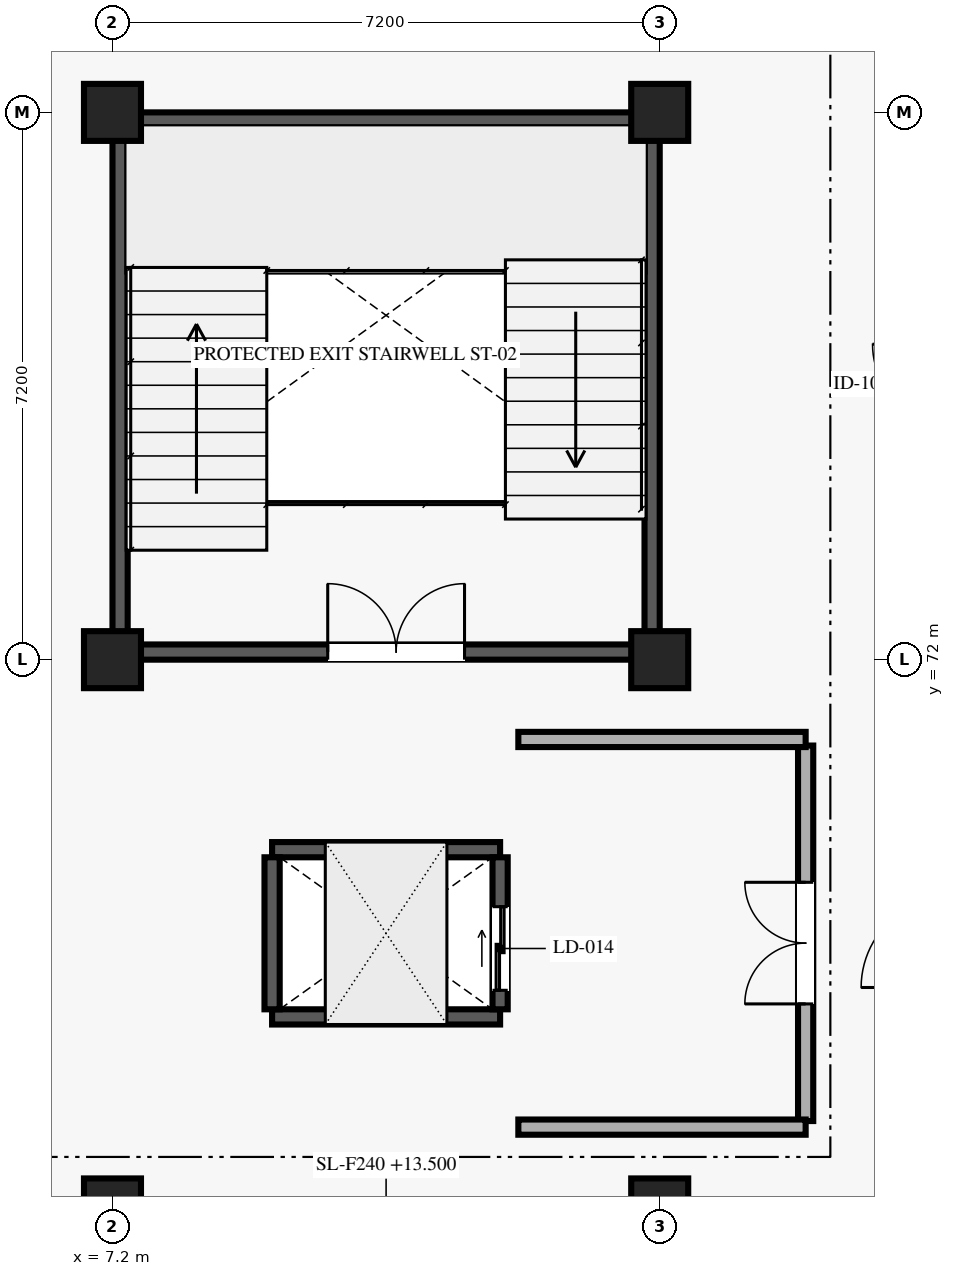
"""IFC4 building model, lengths in metres.
Left out: names, types, materials, properties, quantities, classifications, styles, units other than length and angle.
Written with IfcOpenShell. Run it as: python <this file> out.ifc"""

import sys

from ifc_helpers import new_model, si_unit, direction, frame, frame_2d, origin, origin_2d, place, context, subcontext, project, spatial, rectangle, extrude, element, fill, save


model = new_model("IFC4")
c1 = context("Model", 3, precision=1e-05, world=origin(), true_north=direction((0.0, 1.0)))
c2 = subcontext(c1, "Body", "Model", "MODEL_VIEW")
j1 = project(units=[si_unit("LENGTHUNIT", "METRE"), si_unit("PLANEANGLEUNIT", "RADIAN")], contexts=[c1])
p1 = place(None, origin())
s1 = spatial("IfcSite", under=j1, at=p1, CompositionType="ELEMENT")
p2 = place(p1, origin())
s2 = spatial("IfcBuilding", under=s1, at=p2, CompositionType="ELEMENT")
p3 = place(p2, frame((0.0, 0.0, 13.5)))
s3 = spatial("IfcBuildingStorey", under=s2, at=p3, CompositionType="ELEMENT", Elevation=13.5)
for number, where, z_axis, x_axis in (
    (1, (7.2, 64.8, 0.0), (0.0, 0.0, 1.0), (1.0, 0.0, 0.0)),
    (2, (7.2, 72.0, 0.0), (0.0, 0.0, 1.0), (1.0, 0.0, 0.0)),
    (3, (7.2, 79.2, 0.0), (0.0, 0.0, 1.0), (1.0, 0.0, 0.0)),
    (4, (14.4, 64.8, 0.0), (0.0, 0.0, 1.0), (1.0, 0.0, 0.0)),
    (5, (14.4, 72.0, 0.0), (0.0, 0.0, 1.0), (1.0, 0.0, 0.0)),
    (6, (14.4, 79.2, 0.0), (0.0, 0.0, 1.0), (1.0, 0.0, 0.0)),
):
    element("IfcColumn", number, at=place(p3, frame(where, z_axis=z_axis, x_axis=x_axis)), inside=s3, PredefinedType="COLUMN", context=c2, shape_type="SweptSolid", body=[
        extrude(rectangle(XDim=0.75, YDim=0.75, at=origin_2d()), origin(), (0.0, 0.0, 1.0), 4.05),
    ])
p4 = place(p3, frame((7.4, 72.1, 0.0), z_axis=(0.0, 0.0, 1.0), x_axis=(1.0, 0.0, 0.0)))
e7 = element("IfcWall", 7, at=p4, inside=s3, PredefinedType="SHEAR", context=c2, shape_type="SweptSolid", body=[
    extrude(rectangle(XDim=6.8, YDim=0.2, at=frame_2d((3.4, 0.0))), origin(), (0.0, 0.0, 1.0), 3.81),
])
p5 = place(p4, frame((2.632, 0.0, 0.0)))
e8 = element("IfcOpeningElement", 8, at=p5, cuts=e7, PredefinedType="OPENING", context=c2, shape_type="SweptSolid", body=[
    extrude(rectangle(XDim=1.8, YDim=2.2, at=frame_2d((0.9, 1.1))), frame((0.0, 0.11, 0.0), z_axis=(0.0, -1.0, 0.0), x_axis=(1.0, 0.0, 0.0)), (0.0, 0.0, 1.0), 0.22),
])
for number, where, z_axis, x_axis in (
    (9, (7.4, 79.1, 0.0), (0.0, 0.0, 1.0), (1.0, 0.0, 0.0)),
    (10, (7.3, 72.2, 0.0), (0.0, 0.0, 1.0), (0.0, 1.0, 0.0)),
    (11, (14.3, 72.2, 0.0), (0.0, 0.0, 1.0), (0.0, 1.0, 0.0)),
):
    element("IfcWall", number, at=place(p3, frame(where, z_axis=z_axis, x_axis=x_axis)), inside=s3, PredefinedType="SHEAR", context=c2, shape_type="SweptSolid", body=[
        extrude(rectangle(XDim=6.8, YDim=0.2, at=frame_2d((3.4, 0.0))), origin(), (0.0, 0.0, 1.0), 3.81),
    ])
for number, where, z_axis, x_axis in (
    (12, (9.3, 67.3, 0.0), (0.0, 0.0, 1.0), (1.0, 0.0, 0.0)),
    (13, (9.3, 69.5, 0.0), (0.0, 0.0, 1.0), (1.0, 0.0, 0.0)),
):
    element("IfcWall", number, at=place(p3, frame(where, z_axis=z_axis, x_axis=x_axis)), inside=s3, PredefinedType="SHEAR", context=c2, shape_type="SweptSolid", body=[
        extrude(rectangle(XDim=3.0, YDim=0.2, at=frame_2d((1.5, 0.0))), origin(), (0.0, 0.0, 1.0), 3.81),
    ])
p6 = place(p3, frame((9.3, 67.4, 0.0), z_axis=(0.0, 0.0, 1.0), x_axis=(0.0, 1.0, 0.0)))
e14 = element("IfcWall", 14, at=p6, inside=s3, PredefinedType="SHEAR", context=c2, shape_type="SweptSolid", body=[
    extrude(rectangle(XDim=2.0, YDim=0.2, at=frame_2d((1.0, 0.0))), origin(), (0.0, 0.0, 1.0), 3.81),
])
p7 = place(p3, frame((12.3, 67.4, 0.0), z_axis=(0.0, 0.0, 1.0), x_axis=(0.0, 1.0, 0.0)))
e15 = element("IfcWall", 15, at=p7, inside=s3, PredefinedType="SHEAR", context=c2, shape_type="SweptSolid", body=[
    extrude(rectangle(XDim=2.0, YDim=0.2, at=frame_2d((1.0, 0.0))), origin(), (0.0, 0.0, 1.0), 3.81),
])
p8 = place(p7, frame((0.25, 0.0, 0.0)))
e16 = element("IfcOpeningElement", 16, at=p8, cuts=e15, PredefinedType="OPENING", context=c2, shape_type="SweptSolid", body=[
    extrude(rectangle(XDim=1.1, YDim=2.15, at=frame_2d((0.55, 1.075))), frame((0.0, 0.11, 0.0), z_axis=(0.0, -1.0, 0.0), x_axis=(1.0, 0.0, 0.0)), (0.0, 0.0, 1.0), 0.22),
])
p9 = place(p3, frame((16.32, 65.93, 0.0), z_axis=(0.0, 0.0, 1.0), x_axis=(0.0, 1.0, 0.0)))
e17 = element("IfcWall", 17, at=p9, inside=s3, PredefinedType="SOLIDWALL", context=c2, shape_type="SweptSolid", body=[
    extrude(rectangle(XDim=4.94, YDim=0.2, at=frame_2d((2.47, 0.0))), origin(), (0.0, 0.0, 1.0), 3.81),
])
p10 = place(p9, frame((1.541, 0.0, 0.0)))
e18 = element("IfcOpeningElement", 18, at=p10, cuts=e17, PredefinedType="OPENING", context=c2, shape_type="SweptSolid", body=[
    extrude(rectangle(XDim=1.6, YDim=2.2, at=frame_2d((0.8, 1.1))), frame((0.0, 0.11, 0.0), z_axis=(0.0, -1.0, 0.0), x_axis=(1.0, 0.0, 0.0)), (0.0, 0.0, 1.0), 0.22),
])
for number, where, z_axis, x_axis in (
    (19, (12.54, 65.85, 0.0), (0.0, 0.0, 1.0), (1.0, 0.0, 0.0)),
    (20, (12.54, 70.95, 0.0), (0.0, 0.0, 1.0), (1.0, 0.0, 0.0)),
):
    element("IfcWall", number, at=place(p3, frame(where, z_axis=z_axis, x_axis=x_axis)), inside=s3, PredefinedType="SOLIDWALL", context=c2, shape_type="SweptSolid", body=[
        extrude(rectangle(XDim=3.78, YDim=0.2, at=frame_2d((1.89, 0.0))), origin(), (0.0, 0.0, 1.0), 3.81),
    ])
p11 = place(p5, origin())
e21 = element("IfcDoor", 21, at=p11, inside=s3, OperationType="DOUBLE_DOOR_SINGLE_SWING", PredefinedType="DOOR", context=c2, shape_type="SweptSolid", body=[
    extrude(rectangle(XDim=1.8, YDim=2.2, at=frame_2d((0.9, 1.1))), frame((0.0, 0.025, 0.0), z_axis=(0.0, -1.0, 0.0), x_axis=(1.0, 0.0, 0.0)), (0.0, 0.0, 1.0), 0.05),
])
fill(e8, e21)
p12 = place(p8, origin())
e22 = element("IfcDoor", 22, at=p12, inside=s3, OperationType="DOUBLE_DOOR_SLIDING", PredefinedType="DOOR", context=c2, shape_type="SweptSolid", body=[
    extrude(rectangle(XDim=1.1, YDim=2.15, at=frame_2d((0.55, 1.075))), frame((0.0, 0.025, 0.0), z_axis=(0.0, -1.0, 0.0), x_axis=(1.0, 0.0, 0.0)), (0.0, 0.0, 1.0), 0.05),
])
fill(e16, e22)
p13 = place(p10, origin())
e23 = element("IfcDoor", 23, at=p13, inside=s3, OperationType="DOUBLE_DOOR_SINGLE_SWING", PredefinedType="DOOR", context=c2, shape_type="SweptSolid", body=[
    extrude(rectangle(XDim=1.6, YDim=2.2, at=frame_2d((0.8, 1.1))), frame((0.0, 0.025, 0.0), z_axis=(0.0, -1.0, 0.0), x_axis=(1.0, 0.0, 0.0)), (0.0, 0.0, 1.0), 0.05),
])
fill(e18, e23)
save(model, sys.argv[1])
